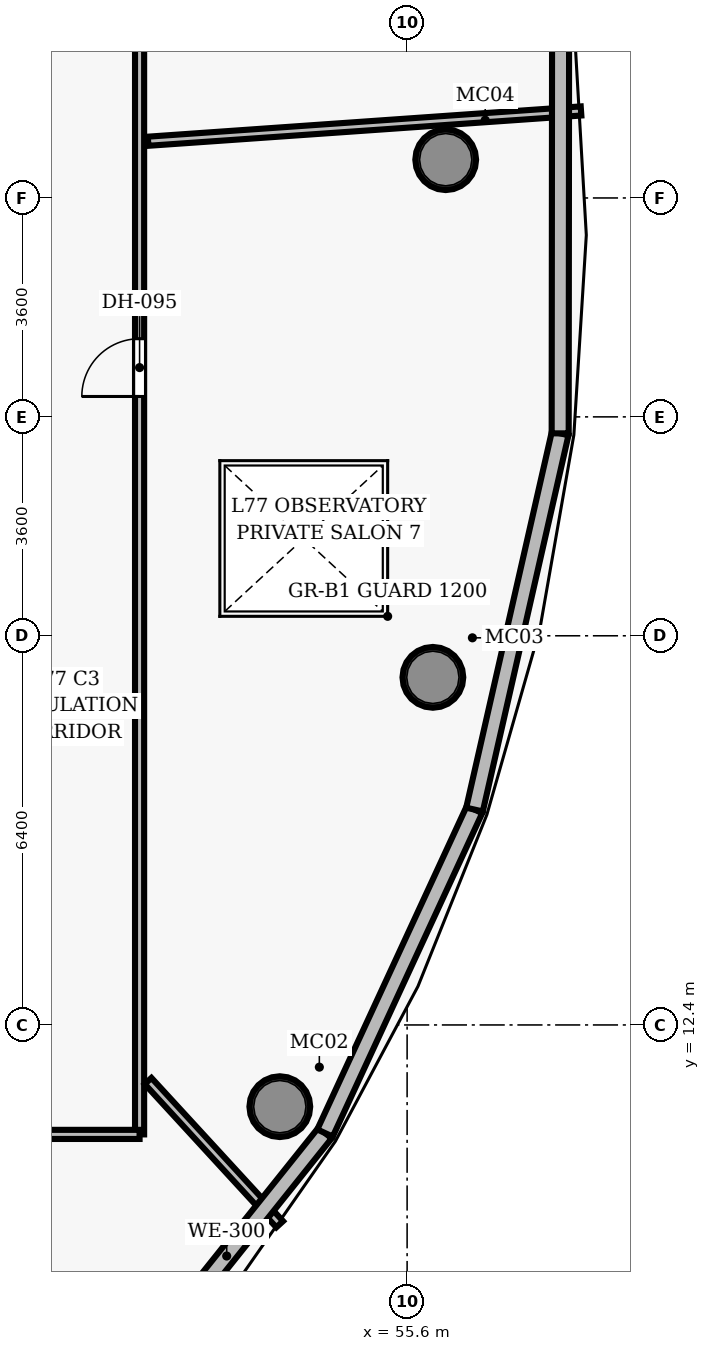
"""IFC4 building model, lengths in metres.
Left out: names, types, materials, properties, quantities, classifications, styles, units other than length and angle.
Written with IfcOpenShell. Run it as: python <this file> out.ifc"""

import sys

from ifc_helpers import new_model, si_unit, direction, frame, frame_2d, origin, origin_2d, place, context, subcontext, project, spatial, rectangle, hollow_circle, extrude, element, fill, save


model = new_model("IFC4")
c1 = context("Model", 3, precision=1e-05, world=origin(), true_north=direction((0.0, 1.0)))
c2 = subcontext(c1, "Body", "Model", "MODEL_VIEW")
j1 = project(units=[si_unit("LENGTHUNIT", "METRE"), si_unit("PLANEANGLEUNIT", "RADIAN")], contexts=[c1])
p1 = place(None, origin())
s1 = spatial("IfcSite", under=j1, at=p1, CompositionType="ELEMENT")
p2 = place(p1, origin())
s2 = spatial("IfcBuilding", under=s1, at=p2, CompositionType="ELEMENT")
p3 = place(p2, frame((0.0, 0.0, 303.65)))
s3 = spatial("IfcBuildingStorey", under=s2, at=p3, CompositionType="ELEMENT", Elevation=303.65)
for number, where, z_axis, x_axis in (
    (1, (53.506, 11.056, 0.0), (0.0, 0.0, 1.0), (1.0, 0.0, 0.0)),
    (2, (56.024, 18.116, 0.0), (0.0, 0.0, 1.0), (1.0, 0.0, 0.0)),
    (3, (56.235, 26.629, 0.0), (0.0, 0.0, 1.0), (1.0, 0.0, 0.0)),
):
    element("IfcColumn", number, at=place(p3, frame(where, z_axis=z_axis, x_axis=x_axis)), inside=s3, PredefinedType="COLUMN", context=c2, shape_type="SweptSolid", body=[
        extrude(hollow_circle(Radius=0.5, WallThickness=0.045, at=origin_2d()), origin(), (0.0, 0.0, 1.0), 3.85),
    ])
p4 = place(p3, frame((51.2, 10.6, 0.0), z_axis=(0.0, 0.0, 1.0), x_axis=(0.0, 1.0, 0.0)))
e4 = element("IfcWall", 4, at=p4, inside=s3, PredefinedType="PARTITIONING", context=c2, shape_type="SweptSolid", body=[
    extrude(rectangle(XDim=30.8, YDim=0.15, at=frame_2d((15.4, 0.0))), origin(), (0.0, 0.0, 1.0), 3.015),
])
p5 = place(p4, frame((18.976, 0.0, 0.0)))
e5 = element("IfcOpeningElement", 5, at=p5, cuts=e4, PredefinedType="OPENING", context=c2, shape_type="SweptSolid", body=[
    extrude(rectangle(XDim=1.5, YDim=2.2, at=frame_2d((0.75, 1.1))), frame((0.0, 0.085, 0.0), z_axis=(0.0, -1.0, 0.0), x_axis=(1.0, 0.0, 0.0)), (0.0, 0.0, 1.0), 0.17),
])
p6 = place(p4, frame((12.135, 0.0, 0.0)))
e6 = element("IfcOpeningElement", 6, at=p6, cuts=e4, PredefinedType="OPENING", context=c2, shape_type="SweptSolid", body=[
    extrude(rectangle(XDim=0.95, YDim=2.15, at=frame_2d((0.475, 1.075))), frame((0.0, 0.085, 0.0), z_axis=(0.0, -1.0, 0.0), x_axis=(1.0, 0.0, 0.0)), (0.0, 0.0, 1.0), 0.17),
])
p7 = place(p3, frame((49.1, 10.6, 0.0), z_axis=(0.0, 0.0, 1.0), x_axis=(1.0, 0.0, 0.0)))
e7 = element("IfcWall", 7, at=p7, inside=s3, PredefinedType="PARTITIONING", context=c2, shape_type="SweptSolid", body=[
    extrude(rectangle(XDim=2.1, YDim=0.15, at=frame_2d((1.05, 0.0))), origin(), (0.0, 0.0, 1.0), 3.015),
])
p8 = place(p3, frame((51.34, 26.933, 0.0), z_axis=(0.0, 0.0, 1.0), x_axis=(0.997564872664, 0.069744711815, 0.0)))
e8 = element("IfcWall", 8, at=p8, inside=s3, PredefinedType="PARTITIONING", context=c2, shape_type="SweptSolid", body=[
    extrude(rectangle(XDim=7.137, YDim=0.15, at=frame_2d((3.569, 0.0))), origin(), (0.0, 0.0, 1.0), 3.015),
])
p9 = place(p3, frame((51.34, 11.478, 0.0), z_axis=(0.0, 0.0, 1.0), x_axis=(0.676515680842, -0.736428227036, 0.0)))
e9 = element("IfcWall", 9, at=p9, inside=s3, PredefinedType="PARTITIONING", context=c2, shape_type="SweptSolid", body=[
    extrude(rectangle(XDim=3.199, YDim=0.15, at=frame_2d((1.599, 0.0))), origin(), (0.0, 0.0, 1.0), 3.015),
])
p10 = place(p3, frame((54.25, 10.623, 0.0), z_axis=(0.0, 0.0, 1.0), x_axis=(-0.624465086055, -0.781052723123, 0.0)))
e10 = element("IfcWall", 10, at=p10, inside=s3, PredefinedType="SOLIDWALL", context=c2, shape_type="SweptSolid", body=[
    extrude(rectangle(XDim=5.179, YDim=0.28, at=frame_2d((2.59, 0.0))), origin(), (0.0, 0.0, 1.0), 3.6),
])
p11 = place(p3, frame((56.708, 15.942, 0.0), z_axis=(0.0, 0.0, 1.0), x_axis=(-0.419589157981, -0.907714128184, 0.0)))
e11 = element("IfcWall", 11, at=p11, inside=s3, PredefinedType="SOLIDWALL", context=c2, shape_type="SweptSolid", body=[
    extrude(rectangle(XDim=5.86, YDim=0.28, at=frame_2d((2.93, 0.0))), origin(), (0.0, 0.0, 1.0), 3.6),
])
p12 = place(p3, frame((58.117, 22.129, 0.0), z_axis=(0.0, 0.0, 1.0), x_axis=(-0.222003573724, -0.975045851873, 0.0)))
e12 = element("IfcWall", 12, at=p12, inside=s3, PredefinedType="SOLIDWALL", context=c2, shape_type="SweptSolid", body=[
    extrude(rectangle(XDim=6.345, YDim=0.28, at=frame_2d((3.173, 0.0))), origin(), (0.0, 0.0, 1.0), 3.6),
])
p13 = place(p3, frame((58.124, 28.655, 0.0), z_axis=(0.0, 0.0, 1.0), x_axis=(-0.001010062707, -0.999999489887, 0.0)))
e13 = element("IfcWall", 13, at=p13, inside=s3, PredefinedType="SOLIDWALL", context=c2, shape_type="SweptSolid", body=[
    extrude(rectangle(XDim=6.526, YDim=0.28, at=frame_2d((3.263, 0.0))), origin(), (0.0, 0.0, 1.0), 3.6),
])
p14 = place(p6, origin())
e14 = element("IfcDoor", 14, at=p14, inside=s3, OperationType="SINGLE_SWING_LEFT", PredefinedType="DOOR", context=c2, shape_type="SweptSolid", body=[
    extrude(rectangle(XDim=0.95, YDim=2.15, at=frame_2d((0.475, 1.075))), frame((0.0, 0.025, 0.0), z_axis=(0.0, -1.0, 0.0), x_axis=(1.0, 0.0, 0.0)), (0.0, 0.0, 1.0), 0.05),
])
fill(e6, e14)
save(model, sys.argv[1])
